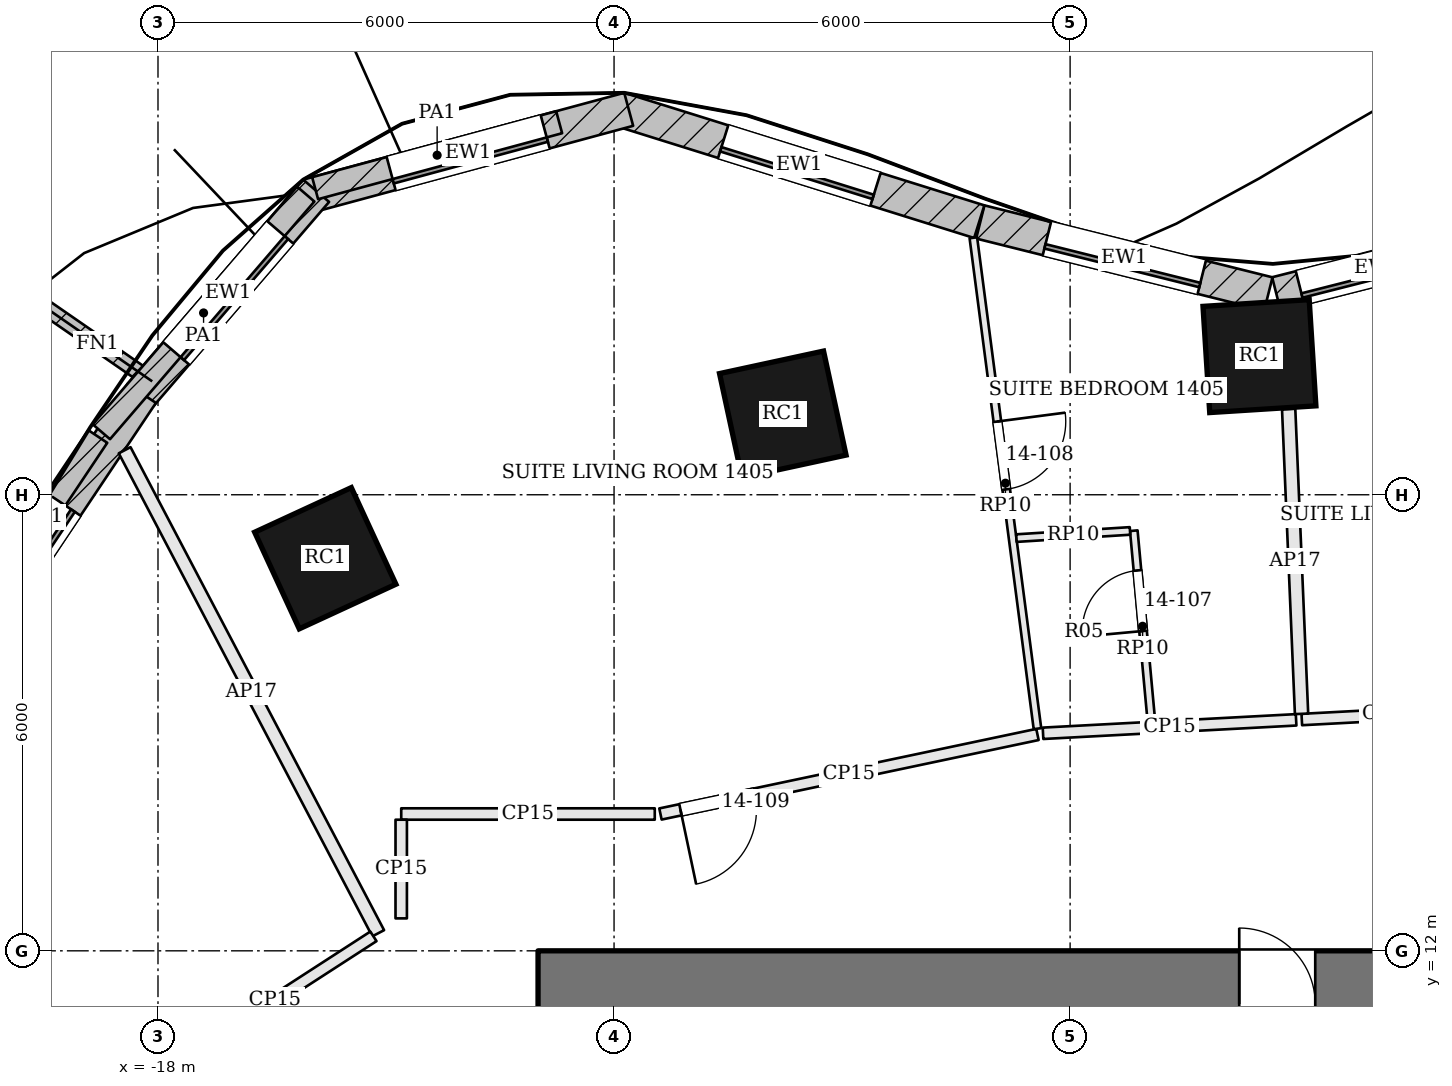
"""IFC4 building model, lengths in metres.
Left out: names, types, materials, properties, quantities, classifications, styles, units other than length and angle.
Written with IfcOpenShell. Run it as: python <this file> out.ifc"""

import sys

from ifc_helpers import new_model, si_unit, direction, frame, frame_2d, origin, origin_2d, place, context, subcontext, project, spatial, rectangle, extrude, element, fill, save


model = new_model("IFC4")
c1 = context("Model", 3, precision=1e-05, world=origin(), true_north=direction((0.0, 1.0)))
c2 = subcontext(c1, "Body", "Model", "MODEL_VIEW")
j1 = project(units=[si_unit("LENGTHUNIT", "METRE"), si_unit("PLANEANGLEUNIT", "RADIAN")], contexts=[c1])
p1 = place(None, origin())
s1 = spatial("IfcSite", under=j1, at=p1, CompositionType="ELEMENT")
p2 = place(p1, origin())
s2 = spatial("IfcBuilding", under=s1, at=p2, CompositionType="ELEMENT")
p3 = place(p2, frame((0.0, 0.0, 66.3)))
s3 = spatial("IfcBuildingStorey", under=s2, at=p3, CompositionType="ELEMENT", Elevation=66.3)
p4 = place(p3, frame((-13.0, 11.3, 0.0), z_axis=(0.0, 0.0, 1.0), x_axis=(1.0, 0.0, 0.0)))
e1 = element("IfcWall", 1, at=p4, inside=s3, PredefinedType="SHEAR", context=c2, shape_type="SweptSolid", body=[
    extrude(rectangle(XDim=26.0, YDim=1.4, at=frame_2d((13.0, 0.0))), origin(), (0.0, 0.0, 1.0), 3.6),
])
p5 = place(p4, frame((9.225, 0.0, 0.0)))
e2 = element("IfcOpeningElement", 2, at=p5, cuts=e1, PredefinedType="OPENING", context=c2, shape_type="SweptSolid", body=[
    extrude(rectangle(XDim=1.0, YDim=2.1, at=frame_2d((0.5, 1.05))), frame((0.0, 0.71, 0.0), z_axis=(0.0, -1.0, 0.0), x_axis=(1.0, 0.0, 0.0)), (0.0, 0.0, 1.0), 1.42),
])
p6 = place(p4, frame((12.225, 0.0, 0.0)))
e3 = element("IfcOpeningElement", 3, at=p6, cuts=e1, PredefinedType="OPENING", context=c2, shape_type="SweptSolid", body=[
    extrude(rectangle(XDim=0.7, YDim=2.1, at=frame_2d((0.35, 1.05))), frame((0.0, 0.71, 0.0), z_axis=(0.0, -1.0, 0.0), x_axis=(1.0, 0.0, 0.0)), (0.0, 0.0, 1.0), 1.42),
])
p7 = place(p4, frame((14.125, 0.0, 0.0)))
e4 = element("IfcOpeningElement", 4, at=p7, cuts=e1, PredefinedType="OPENING", context=c2, shape_type="SweptSolid", body=[
    extrude(rectangle(XDim=1.0, YDim=2.1, at=frame_2d((0.5, 1.05))), frame((0.0, 0.71, 0.0), z_axis=(0.0, -1.0, 0.0), x_axis=(1.0, 0.0, 0.0)), (0.0, 0.0, 1.0), 1.42),
])
p8 = place(p4, frame((15.65, 0.0, 0.0)))
e5 = element("IfcOpeningElement", 5, at=p8, cuts=e1, PredefinedType="OPENING", context=c2, shape_type="SweptSolid", body=[
    extrude(rectangle(XDim=1.0, YDim=2.1, at=frame_2d((0.5, 1.05))), frame((0.0, 0.71, 0.0), z_axis=(0.0, -1.0, 0.0), x_axis=(1.0, 0.0, 0.0)), (0.0, 0.0, 1.0), 1.42),
])
for number, where, z_axis, x_axis in (
    (6, (-3.509, 19.824, 0.0), (0.0, 0.0, 1.0), (-0.998, -0.063, 0.0)),
    (7, (-9.78, 19.058, 0.0), (0.0, 0.0, 1.0), (-0.977, -0.211, 0.0)),
    (8, (-15.799, 17.165, 0.0), (0.0, 0.0, 1.0), (-0.908, -0.419, 0.0)),
):
    element("IfcColumn", number, at=place(p3, frame(where, z_axis=z_axis, x_axis=x_axis)), inside=s3, PredefinedType="COLUMN", context=c2, shape_type="SweptSolid", body=[
        extrude(rectangle(XDim=1.4, YDim=1.4, at=origin_2d()), origin(), (0.0, 0.0, 1.0), 3.6),
    ])
p9 = place(p3, frame((-0.628, 21.319, 0.0), z_axis=(0.0, 0.0, 1.0), x_axis=(-0.969240543873, -0.246115355295, 0.0)))
e9 = element("IfcWall", 9, at=p9, inside=s3, PredefinedType="SOLIDWALL", context=c2, shape_type="SweptSolid", body=[
    extrude(rectangle(XDim=2.743, YDim=0.45, at=frame_2d((1.372, 0.0))), origin(), (0.0, 0.0, 1.0), 3.4),
])
p10 = place(p9, frame((0.321, 0.0, 0.9)))
e10 = element("IfcOpeningElement", 10, at=p10, cuts=e9, PredefinedType="OPENING", context=c2, shape_type="SweptSolid", body=[
    extrude(rectangle(XDim=2.1, YDim=2.0, at=frame_2d((1.05, 1.0))), frame((0.0, 0.235, 0.0), z_axis=(0.0, -1.0, 0.0), x_axis=(1.0, 0.0, 0.0)), (0.0, 0.0, 1.0), 0.47),
])
p11 = place(p3, frame((-3.392, 20.642, 0.0), z_axis=(0.0, 0.0, 1.0), x_axis=(-0.970168229467, 0.242432684539, 0.0)))
e11 = element("IfcWall", 11, at=p11, inside=s3, PredefinedType="SOLIDWALL", context=c2, shape_type="SweptSolid", body=[
    extrude(rectangle(XDim=3.906, YDim=0.45, at=frame_2d((1.953, 0.0))), origin(), (0.0, 0.0, 1.0), 3.4),
])
p12 = place(p11, frame((0.903, 0.0, 0.9)))
e12 = element("IfcOpeningElement", 12, at=p12, cuts=e11, PredefinedType="OPENING", context=c2, shape_type="SweptSolid", body=[
    extrude(rectangle(XDim=2.1, YDim=2.0, at=frame_2d((1.05, 1.0))), frame((0.0, 0.235, 0.0), z_axis=(0.0, -1.0, 0.0), x_axis=(1.0, 0.0, 0.0)), (0.0, 0.0, 1.0), 0.47),
])
p13 = place(p3, frame((-7.196, 21.593, 0.0), z_axis=(0.0, 0.0, 1.0), x_axis=(-0.954471218741, 0.298303021432, 0.0)))
e13 = element("IfcWall", 13, at=p13, inside=s3, PredefinedType="SOLIDWALL", context=c2, shape_type="SweptSolid", body=[
    extrude(rectangle(XDim=4.96, YDim=0.45, at=frame_2d((2.48, 0.0))), origin(), (0.0, 0.0, 1.0), 3.4),
])
p14 = place(p13, frame((1.43, 0.0, 0.9)))
e14 = element("IfcOpeningElement", 14, at=p14, cuts=e13, PredefinedType="OPENING", context=c2, shape_type="SweptSolid", body=[
    extrude(rectangle(XDim=2.1, YDim=2.0, at=frame_2d((1.05, 1.0))), frame((0.0, 0.235, 0.0), z_axis=(0.0, -1.0, 0.0), x_axis=(1.0, 0.0, 0.0)), (0.0, 0.0, 1.0), 0.47),
])
p15 = place(p3, frame((-11.807, 23.071, 0.0), z_axis=(0.0, 0.0, 1.0), x_axis=(-0.965334520334, -0.261015830653, 0.0)))
e15 = element("IfcWall", 15, at=p15, inside=s3, PredefinedType="SOLIDWALL", context=c2, shape_type="SweptSolid", body=[
    extrude(rectangle(XDim=4.375, YDim=0.45, at=frame_2d((2.188, 0.0))), origin(), (0.0, 0.0, 1.0), 3.4),
])
p16 = place(p15, frame((1.138, 0.0, 0.9)))
e16 = element("IfcOpeningElement", 16, at=p16, cuts=e15, PredefinedType="OPENING", context=c2, shape_type="SweptSolid", body=[
    extrude(rectangle(XDim=2.1, YDim=2.0, at=frame_2d((1.05, 1.0))), frame((0.0, 0.235, 0.0), z_axis=(0.0, -1.0, 0.0), x_axis=(1.0, 0.0, 0.0)), (0.0, 0.0, 1.0), 0.47),
])
p17 = place(p3, frame((-15.919, 21.999, 0.0), z_axis=(0.0, 0.0, 1.0), x_axis=(-0.652009971272, -0.758210391225, 0.0)))
e17 = element("IfcWall", 17, at=p17, inside=s3, PredefinedType="SOLIDWALL", context=c2, shape_type="SweptSolid", body=[
    extrude(rectangle(XDim=3.545, YDim=0.45, at=frame_2d((1.772, 0.0))), origin(), (0.0, 0.0, 1.0), 3.4),
])
p18 = place(p17, frame((0.722, 0.0, 0.9)))
e18 = element("IfcOpeningElement", 18, at=p18, cuts=e17, PredefinedType="OPENING", context=c2, shape_type="SweptSolid", body=[
    extrude(rectangle(XDim=2.1, YDim=2.0, at=frame_2d((1.05, 1.0))), frame((0.0, 0.235, 0.0), z_axis=(0.0, -1.0, 0.0), x_axis=(1.0, 0.0, 0.0)), (0.0, 0.0, 1.0), 0.47),
])
p19 = place(p3, frame((-18.214, 19.333, 0.0), z_axis=(0.0, 0.0, 1.0), x_axis=(-0.555833135316, -0.831293886471, 0.0)))
e19 = element("IfcWall", 19, at=p19, inside=s3, PredefinedType="SOLIDWALL", context=c2, shape_type="SweptSolid", body=[
    extrude(rectangle(XDim=5.368, YDim=0.45, at=frame_2d((2.684, 0.0))), origin(), (0.0, 0.0, 1.0), 3.4),
])
p20 = place(p19, frame((1.784, 0.0, 0.9)))
e20 = element("IfcOpeningElement", 20, at=p20, cuts=e19, PredefinedType="OPENING", context=c2, shape_type="SweptSolid", body=[
    extrude(rectangle(XDim=1.8, YDim=2.0, at=frame_2d((0.9, 1.0))), frame((0.0, 0.235, 0.0), z_axis=(0.0, -1.0, 0.0), x_axis=(1.0, 0.0, 0.0)), (0.0, 0.0, 1.0), 0.47),
])
p21 = place(p3, frame((-18.076, 19.492, 0.0), z_axis=(0.0, 0.0, 1.0), x_axis=(-0.822618823872, 0.568593238274, 0.0)))
e21 = element("IfcWall", 21, at=p21, inside=s3, PredefinedType="SOLIDWALL", context=c2, shape_type="SweptSolid", body=[
    extrude(rectangle(XDim=1.75, YDim=0.2, at=frame_2d((0.875, 0.0))), origin(), (0.0, 0.0, 1.0), 3.4),
])
p22 = place(p3, frame((-12.722, 22.901, 3.6), z_axis=(0.0, 0.0, 1.0), x_axis=(-0.96534590031, -0.260973739589, 0.0)))
e22 = element("IfcWall", 22, at=p22, inside=s3, PredefinedType="PARAPET", context=c2, shape_type="SweptSolid", body=[
    extrude(rectangle(XDim=3.326, YDim=0.3, at=frame_2d((1.663, 0.0))), origin(), (0.0, 0.0, 1.0), 1.1),
])
p23 = place(p3, frame((-16.056, 21.956, 3.6), z_axis=(0.0, 0.0, 1.0), x_axis=(-0.652038588201, -0.75818578165, 0.0)))
e23 = element("IfcWall", 23, at=p23, inside=s3, PredefinedType="PARAPET", context=c2, shape_type="SweptSolid", body=[
    extrude(rectangle(XDim=4.124, YDim=0.3, at=frame_2d((2.062, 0.0))), origin(), (0.0, 0.0, 1.0), 1.1),
])
p24 = place(p3, frame((-18.792, 18.767, 3.6), z_axis=(0.0, 0.0, 1.0), x_axis=(-0.555843382853, -0.831287034507, 0.0)))
e24 = element("IfcWall", 24, at=p24, inside=s3, PredefinedType="PARAPET", context=c2, shape_type="SweptSolid", body=[
    extrude(rectangle(XDim=2.562, YDim=0.3, at=frame_2d((1.281, 0.0))), origin(), (0.0, 0.0, 1.0), 1.1),
])
p25 = place(p3, frame((-0.075, 15.196, 0.0), z_axis=(0.0, 0.0, 1.0), x_axis=(-0.998591959352, -0.053048079307, 0.0)))
e25 = element("IfcWall", 25, at=p25, inside=s3, PredefinedType="PARTITIONING", context=c2, shape_type="SweptSolid", body=[
    extrude(rectangle(XDim=2.881, YDim=0.15, at=frame_2d((1.44, 0.0))), origin(), (0.0, 0.0, 1.0), 2.68),
])
p26 = place(p25, frame((0.808, 0.0, 0.0)))
e26 = element("IfcOpeningElement", 26, at=p26, cuts=e25, PredefinedType="OPENING", context=c2, shape_type="SweptSolid", body=[
    extrude(rectangle(XDim=1.0, YDim=2.1, at=frame_2d((0.5, 1.05))), frame((0.0, 0.085, 0.0), z_axis=(0.0, -1.0, 0.0), x_axis=(1.0, 0.0, 0.0)), (0.0, 0.0, 1.0), 0.17),
])
p27 = place(p3, frame((-3.125, 19.127, 0.0), z_axis=(0.0, 0.0, 1.0), x_axis=(0.042285996913, -0.99910554721, 0.0)))
e27 = element("IfcWall", 27, at=p27, inside=s3, PredefinedType="PARTITIONING", context=c2, shape_type="SweptSolid", body=[
    extrude(rectangle(XDim=4.013, YDim=0.175, at=frame_2d((2.006, 0.0))), origin(), (0.0, 0.0, 1.0), 2.68),
])
p28 = place(p3, frame((-3.027, 15.039, 0.0), z_axis=(0.0, 0.0, 1.0), x_axis=(-0.998589773409, -0.053089212123, 0.0)))
e28 = element("IfcWall", 28, at=p28, inside=s3, PredefinedType="PARTITIONING", context=c2, shape_type="SweptSolid", body=[
    extrude(rectangle(XDim=3.334, YDim=0.15, at=frame_2d((1.667, 0.0))), origin(), (0.0, 0.0, 1.0), 2.68),
])
p29 = place(p3, frame((-6.43, 14.846, 0.0), z_axis=(0.0, 0.0, 1.0), x_axis=(-0.978470502428, -0.206386714394, 0.0)))
e29 = element("IfcWall", 29, at=p29, inside=s3, PredefinedType="PARTITIONING", context=c2, shape_type="SweptSolid", body=[
    extrude(rectangle(XDim=5.069, YDim=0.15, at=frame_2d((2.534, 0.0))), origin(), (0.0, 0.0, 1.0), 2.68),
])
p30 = place(p29, frame((3.8, 0.0, 0.0)))
e30 = element("IfcOpeningElement", 30, at=p30, cuts=e29, PredefinedType="OPENING", context=c2, shape_type="SweptSolid", body=[
    extrude(rectangle(XDim=1.0, YDim=2.1, at=frame_2d((0.5, 1.05))), frame((0.0, 0.085, 0.0), z_axis=(0.0, -1.0, 0.0), x_axis=(1.0, 0.0, 0.0)), (0.0, 0.0, 1.0), 0.17),
])
p31 = place(p3, frame((-11.464, 13.8, 0.0), z_axis=(0.0, 0.0, 1.0), x_axis=(-1.0, 0.0, 0.0)))
e31 = element("IfcWall", 31, at=p31, inside=s3, PredefinedType="PARTITIONING", context=c2, shape_type="SweptSolid", body=[
    extrude(rectangle(XDim=3.336, YDim=0.15, at=frame_2d((1.668, 0.0))), origin(), (0.0, 0.0, 1.0), 2.68),
])
p32 = place(p3, frame((-14.8, 13.725, 0.0), z_axis=(0.0, 0.0, 1.0), x_axis=(-0.000188040613, -0.99999998232, 0.0)))
e32 = element("IfcWall", 32, at=p32, inside=s3, PredefinedType="PARTITIONING", context=c2, shape_type="SweptSolid", body=[
    extrude(rectangle(XDim=1.298, YDim=0.15, at=frame_2d((0.649, 0.0))), origin(), (0.0, 0.0, 1.0), 2.68),
])
p33 = place(p3, frame((-18.439, 18.586, 0.0), z_axis=(0.0, 0.0, 1.0), x_axis=(0.464815231758, -0.885407702884, 0.0)))
e33 = element("IfcWall", 33, at=p33, inside=s3, PredefinedType="PARTITIONING", context=c2, shape_type="SweptSolid", body=[
    extrude(rectangle(XDim=7.177, YDim=0.175, at=frame_2d((3.588, 0.0))), origin(), (0.0, 0.0, 1.0), 2.68),
])
p34 = place(p3, frame((-15.166, 12.19, 0.0), z_axis=(0.0, 0.0, 1.0), x_axis=(-0.839538287855, -0.54330052754, 0.0)))
e34 = element("IfcWall", 34, at=p34, inside=s3, PredefinedType="PARTITIONING", context=c2, shape_type="SweptSolid", body=[
    extrude(rectangle(XDim=3.083, YDim=0.15, at=frame_2d((1.542, 0.0))), origin(), (0.0, 0.0, 1.0), 2.68),
])
p35 = place(p3, frame((-7.273, 21.381, 0.0), z_axis=(0.0, 0.0, 1.0), x_axis=(0.129472190921, -0.991583053394, 0.0)))
e35 = element("IfcWall", 35, at=p35, inside=s3, PredefinedType="PARTITIONING", context=c2, shape_type="SweptSolid", body=[
    extrude(rectangle(XDim=6.513, YDim=0.1, at=frame_2d((3.257, 0.0))), origin(), (0.0, 0.0, 1.0), 2.68),
])
p36 = place(p35, frame((2.438, 0.0, 0.0)))
e36 = element("IfcOpeningElement", 36, at=p36, cuts=e35, PredefinedType="OPENING", context=c2, shape_type="SweptSolid", body=[
    extrude(rectangle(XDim=0.9, YDim=2.4, at=frame_2d((0.45, 1.2))), frame((0.0, 0.06, 0.0), z_axis=(0.0, -1.0, 0.0), x_axis=(1.0, 0.0, 0.0)), (0.0, 0.0, 1.0), 0.12),
])
p37 = place(p3, frame((-4.93, 15.013, 0.0), z_axis=(0.0, 0.0, 1.0), x_axis=(-0.09194789711, 0.995763819496, 0.0)))
e37 = element("IfcWall", 37, at=p37, inside=s3, PredefinedType="PARTITIONING", context=c2, shape_type="SweptSolid", body=[
    extrude(rectangle(XDim=2.525, YDim=0.1, at=frame_2d((1.263, 0.0))), origin(), (0.0, 0.0, 1.0), 2.68),
])
p38 = place(p37, frame((1.2, 0.0, 0.0)))
e38 = element("IfcOpeningElement", 38, at=p38, cuts=e37, PredefinedType="OPENING", context=c2, shape_type="SweptSolid", body=[
    extrude(rectangle(XDim=0.8, YDim=2.1, at=frame_2d((0.4, 1.05))), frame((0.0, 0.06, 0.0), z_axis=(0.0, -1.0, 0.0), x_axis=(1.0, 0.0, 0.0)), (0.0, 0.0, 1.0), 0.12),
])
p39 = place(p3, frame((-5.212, 17.524, 0.0), z_axis=(0.0, 0.0, 1.0), x_axis=(-0.998018174443, -0.062926333769, 0.0)))
e39 = element("IfcWall", 39, at=p39, inside=s3, PredefinedType="PARTITIONING", context=c2, shape_type="SweptSolid", body=[
    extrude(rectangle(XDim=1.498, YDim=0.1, at=frame_2d((0.749, 0.0))), origin(), (0.0, 0.0, 1.0), 2.68),
])
p40 = place(p10, origin())
e40 = element("IfcWindow", 40, at=p40, inside=s3, PartitioningType="SINGLE_PANEL", PredefinedType="WINDOW", context=c2, shape_type="SweptSolid", body=[
    extrude(rectangle(XDim=2.1, YDim=2.0, at=frame_2d((1.05, 1.0))), frame((0.0, 0.135, 0.0), z_axis=(0.0, -1.0, 0.0), x_axis=(1.0, 0.0, 0.0)), (0.0, 0.0, 1.0), 0.06),
])
fill(e10, e40)
p41 = place(p12, origin())
e41 = element("IfcWindow", 41, at=p41, inside=s3, PartitioningType="SINGLE_PANEL", PredefinedType="WINDOW", context=c2, shape_type="SweptSolid", body=[
    extrude(rectangle(XDim=2.1, YDim=2.0, at=frame_2d((1.05, 1.0))), frame((0.0, 0.135, 0.0), z_axis=(0.0, -1.0, 0.0), x_axis=(1.0, 0.0, 0.0)), (0.0, 0.0, 1.0), 0.06),
])
fill(e12, e41)
p42 = place(p14, origin())
e42 = element("IfcWindow", 42, at=p42, inside=s3, PartitioningType="SINGLE_PANEL", PredefinedType="WINDOW", context=c2, shape_type="SweptSolid", body=[
    extrude(rectangle(XDim=2.1, YDim=2.0, at=frame_2d((1.05, 1.0))), frame((0.0, 0.135, 0.0), z_axis=(0.0, -1.0, 0.0), x_axis=(1.0, 0.0, 0.0)), (0.0, 0.0, 1.0), 0.06),
])
fill(e14, e42)
p43 = place(p16, origin())
e43 = element("IfcWindow", 43, at=p43, inside=s3, PartitioningType="SINGLE_PANEL", PredefinedType="WINDOW", context=c2, shape_type="SweptSolid", body=[
    extrude(rectangle(XDim=2.1, YDim=2.0, at=frame_2d((1.05, 1.0))), frame((0.0, 0.135, 0.0), z_axis=(0.0, -1.0, 0.0), x_axis=(1.0, 0.0, 0.0)), (0.0, 0.0, 1.0), 0.06),
])
fill(e16, e43)
p44 = place(p18, origin())
e44 = element("IfcWindow", 44, at=p44, inside=s3, PartitioningType="SINGLE_PANEL", PredefinedType="WINDOW", context=c2, shape_type="SweptSolid", body=[
    extrude(rectangle(XDim=2.1, YDim=2.0, at=frame_2d((1.05, 1.0))), frame((0.0, 0.135, 0.0), z_axis=(0.0, -1.0, 0.0), x_axis=(1.0, 0.0, 0.0)), (0.0, 0.0, 1.0), 0.06),
])
fill(e18, e44)
p45 = place(p20, origin())
e45 = element("IfcWindow", 45, at=p45, inside=s3, PartitioningType="SINGLE_PANEL", PredefinedType="WINDOW", context=c2, shape_type="SweptSolid", body=[
    extrude(rectangle(XDim=1.8, YDim=2.0, at=frame_2d((0.9, 1.0))), frame((0.0, 0.135, 0.0), z_axis=(0.0, -1.0, 0.0), x_axis=(1.0, 0.0, 0.0)), (0.0, 0.0, 1.0), 0.06),
])
fill(e20, e45)
p46 = place(p5, origin())
e46 = element("IfcDoor", 46, at=p46, inside=s3, OperationType="SINGLE_SWING_LEFT", PredefinedType="DOOR", context=c2, shape_type="SweptSolid", body=[
    extrude(rectangle(XDim=1.0, YDim=2.1, at=frame_2d((0.5, 1.05))), frame((0.0, 0.025, 0.0), z_axis=(0.0, -1.0, 0.0), x_axis=(1.0, 0.0, 0.0)), (0.0, 0.0, 1.0), 0.05),
])
fill(e2, e46)
p47 = place(p38, origin())
e47 = element("IfcDoor", 47, at=p47, inside=s3, OperationType="SINGLE_SWING_LEFT", PredefinedType="DOOR", context=c2, shape_type="SweptSolid", body=[
    extrude(rectangle(XDim=0.8, YDim=2.1, at=frame_2d((0.4, 1.05))), frame((0.0, 0.025, 0.0), z_axis=(0.0, -1.0, 0.0), x_axis=(1.0, 0.0, 0.0)), (0.0, 0.0, 1.0), 0.05),
])
fill(e38, e47)
p48 = place(p36, origin())
e48 = element("IfcDoor", 48, at=p48, inside=s3, OperationType="SINGLE_SWING_LEFT", PredefinedType="DOOR", context=c2, shape_type="SweptSolid", body=[
    extrude(rectangle(XDim=0.9, YDim=2.4, at=frame_2d((0.45, 1.2))), frame((0.0, 0.025, 0.0), z_axis=(0.0, -1.0, 0.0), x_axis=(1.0, 0.0, 0.0)), (0.0, 0.0, 1.0), 0.05),
])
fill(e36, e48)
p49 = place(p30, origin())
e49 = element("IfcDoor", 49, at=p49, inside=s3, OperationType="SINGLE_SWING_RIGHT", PredefinedType="DOOR", context=c2, shape_type="SweptSolid", body=[
    extrude(rectangle(XDim=1.0, YDim=2.1, at=frame_2d((0.5, 1.05))), frame((0.0, 0.025, 0.0), z_axis=(0.0, -1.0, 0.0), x_axis=(1.0, 0.0, 0.0)), (0.0, 0.0, 1.0), 0.05),
])
fill(e30, e49)
save(model, sys.argv[1])
